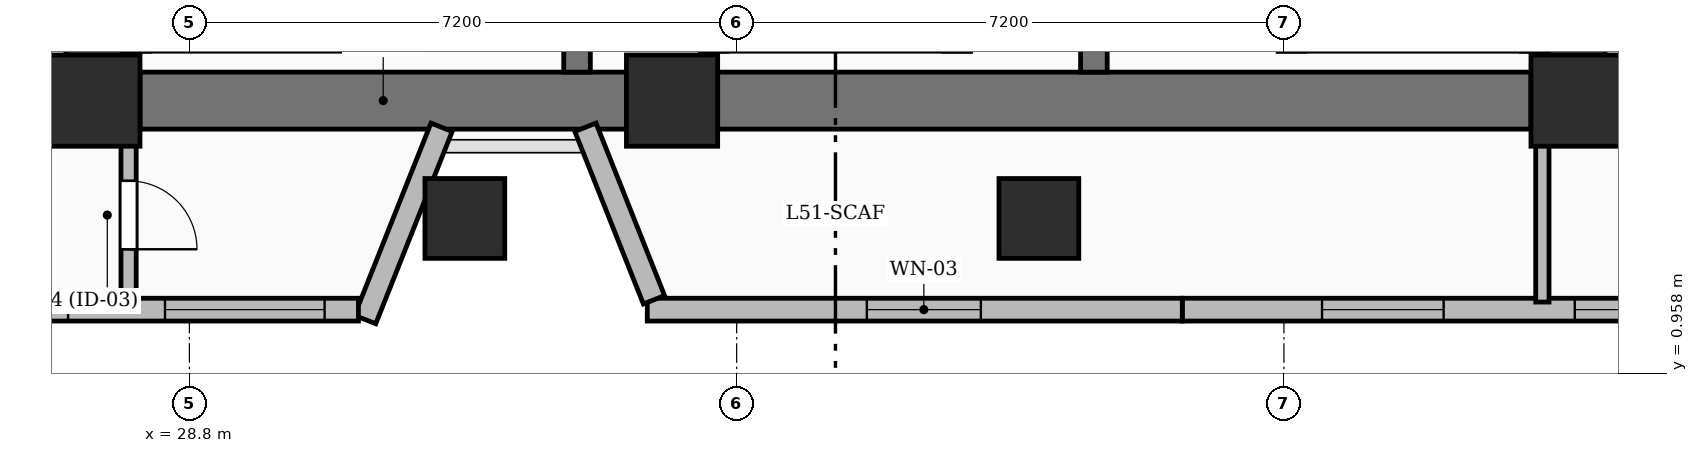
"""IFC4 building model, lengths in metres.
Left out: names, types, materials, properties, quantities, classifications, styles, units other than length and angle.
Written with IfcOpenShell. Run it as: python <this file> out.ifc"""

import sys

from ifc_helpers import new_model, si_unit, direction, frame, frame_2d, origin, origin_2d, place, context, subcontext, project, spatial, rectangle, extrude, element, fill, save


model = new_model("IFC4")
c1 = context("Model", 3, precision=1e-05, world=origin(), true_north=direction((0.0, 1.0)))
c2 = subcontext(c1, "Body", "Model", "MODEL_VIEW")
j1 = project(units=[si_unit("LENGTHUNIT", "METRE"), si_unit("PLANEANGLEUNIT", "RADIAN")], contexts=[c1])
p1 = place(None, origin())
s1 = spatial("IfcSite", under=j1, at=p1, CompositionType="ELEMENT")
p2 = place(p1, origin())
s2 = spatial("IfcBuilding", under=s1, at=p2, CompositionType="ELEMENT")
p3 = place(p2, frame((0.0, 0.0, 196.8)))
s3 = spatial("IfcBuildingStorey", under=s2, at=p3, CompositionType="ELEMENT", Elevation=196.8)
for number, where, z_axis, x_axis in (
    (1, (27.55, 4.55, 0.0), (0.0, 0.0, 1.0), (1.0, 0.0, 0.0)),
    (2, (35.15, 4.55, 0.0), (0.0, 0.0, 1.0), (1.0, 0.0, 0.0)),
    (3, (47.05, 4.55, 0.0), (0.0, 0.0, 1.0), (1.0, 0.0, 0.0)),
):
    element("IfcColumn", number, at=place(p3, frame(where, z_axis=z_axis, x_axis=x_axis)), inside=s3, PredefinedType="COLUMN", context=c2, shape_type="SweptSolid", body=[
        extrude(rectangle(XDim=1.2, YDim=1.2, at=origin_2d()), origin(), (0.0, 0.0, 1.0), 4.8),
    ])
p4 = place(p3, frame((28.15, 4.55, 0.0), z_axis=(0.0, 0.0, 1.0), x_axis=(1.0, 0.0, 0.0)))
e4 = element("IfcWall", 4, at=p4, inside=s3, PredefinedType="SHEAR", context=c2, shape_type="SweptSolid", body=[
    extrude(rectangle(XDim=6.4, YDim=0.75, at=frame_2d((3.2, 0.0))), origin(), (0.0, 0.0, 1.0), 4.8),
])
p5 = place(p3, frame((35.75, 4.55, 0.0), z_axis=(0.0, 0.0, 1.0), x_axis=(1.0, 0.0, 0.0)))
e5 = element("IfcWall", 5, at=p5, inside=s3, PredefinedType="SHEAR", context=c2, shape_type="SweptSolid", body=[
    extrude(rectangle(XDim=10.7, YDim=0.75, at=frame_2d((5.35, 0.0))), origin(), (0.0, 0.0, 1.0), 4.8),
])
for number, where, z_axis, x_axis in (
    (6, (27.55, 5.15, 0.0), (0.0, 0.0, 1.0), (0.0, 1.0, 0.0)),
    (7, (47.05, 5.15, 0.0), (0.0, 0.0, 1.0), (0.0, 1.0, 0.0)),
):
    element("IfcWall", number, at=place(p3, frame(where, z_axis=z_axis, x_axis=x_axis)), inside=s3, PredefinedType="SHEAR", context=c2, shape_type="SweptSolid", body=[
        extrude(rectangle(XDim=9.0, YDim=0.75, at=frame_2d((4.5, 0.0))), origin(), (0.0, 0.0, 1.0), 4.8),
    ])
for number, where, z_axis, x_axis in (
    (8, (33.9, 4.925, 0.0), (0.0, 0.0, 1.0), (0.0, 1.0, 0.0)),
    (9, (40.7, 4.925, 0.0), (0.0, 0.0, 1.0), (0.0, 1.0, 0.0)),
):
    element("IfcWall", number, at=place(p3, frame(where, z_axis=z_axis, x_axis=x_axis)), inside=s3, PredefinedType="SOLIDWALL", context=c2, shape_type="SweptSolid", body=[
        extrude(rectangle(XDim=3.0, YDim=0.35, at=frame_2d((1.5, 0.0))), origin(), (0.0, 0.0, 1.0), 4.8),
    ])
for number, where, z_axis, x_axis in (
    (10, (32.424, 3.0, 0.0), (0.0, 0.0, 1.0), (1.0, 0.0, 0.0)),
    (11, (39.976, 3.0, 0.0), (0.0, 0.0, 1.0), (1.0, 0.0, 0.0)),
):
    element("IfcColumn", number, at=place(p3, frame(where, z_axis=z_axis, x_axis=x_axis)), inside=s3, PredefinedType="COLUMN", context=c2, shape_type="SweptSolid", body=[
        extrude(rectangle(XDim=1.05, YDim=1.05, at=origin_2d()), origin(), (0.0, 0.0, 1.0), 4.8),
    ])
p6 = place(p3, frame((48.901, 1.8, 0.0), z_axis=(0.0, 0.0, 1.0), x_axis=(-1.0, 0.0, 0.0)))
e12 = element("IfcWall", 12, at=p6, inside=s3, PredefinedType="SOLIDWALL", context=c2, shape_type="SweptSolid", body=[
    extrude(rectangle(XDim=7.039, YDim=0.3, at=frame_2d((3.519, 0.0))), origin(), (0.0, 0.0, 1.0), 4.5),
])
p7 = place(p6, frame((3.6, 0.0, 0.55)))
e13 = element("IfcOpeningElement", 13, at=p7, cuts=e12, PredefinedType="OPENING", context=c2, shape_type="SweptSolid", body=[
    extrude(rectangle(XDim=1.6, YDim=2.2, at=frame_2d((0.8, 1.1))), frame((0.0, 0.16, 0.0), z_axis=(0.0, -1.0, 0.0), x_axis=(1.0, 0.0, 0.0)), (0.0, 0.0, 1.0), 0.32),
])
p8 = place(p6, frame((0.675, 0.0, 0.8)))
e14 = element("IfcOpeningElement", 14, at=p8, cuts=e12, PredefinedType="OPENING", context=c2, shape_type="SweptSolid", body=[
    extrude(rectangle(XDim=1.2, YDim=1.8, at=frame_2d((0.6, 0.9))), frame((0.0, 0.16, 0.0), z_axis=(0.0, -1.0, 0.0), x_axis=(1.0, 0.0, 0.0)), (0.0, 0.0, 1.0), 0.32),
])
p9 = place(p3, frame((41.863, 1.8, 0.0), z_axis=(0.0, 0.0, 1.0), x_axis=(-1.0, 0.0, 0.0)))
e15 = element("IfcWall", 15, at=p9, inside=s3, PredefinedType="SOLIDWALL", context=c2, shape_type="SweptSolid", body=[
    extrude(rectangle(XDim=7.039, YDim=0.3, at=frame_2d((3.52, 0.0))), origin(), (0.0, 0.0, 1.0), 4.5),
])
p10 = place(p9, frame((2.65, 0.0, 0.6)))
e16 = element("IfcOpeningElement", 16, at=p10, cuts=e15, PredefinedType="OPENING", context=c2, shape_type="SweptSolid", body=[
    extrude(rectangle(XDim=1.5, YDim=2.1, at=frame_2d((0.75, 1.05))), frame((0.0, 0.16, 0.0), z_axis=(0.0, -1.0, 0.0), x_axis=(1.0, 0.0, 0.0)), (0.0, 0.0, 1.0), 0.32),
])
p11 = place(p3, frame((34.912, 1.93, 0.0), z_axis=(0.0, 0.0, 1.0), x_axis=(-0.369476217581, 0.929240186734, 0.0)))
e17 = element("IfcWall", 17, at=p11, inside=s3, PredefinedType="SOLIDWALL", context=c2, shape_type="SweptSolid", body=[
    extrude(rectangle(XDim=2.442, YDim=0.3, at=frame_2d((1.221, 0.0))), origin(), (0.0, 0.0, 1.0), 2.3),
])
p12 = place(p3, frame((32.118, 4.199, 0.0), z_axis=(0.0, 0.0, 1.0), x_axis=(-0.369487569888, -0.929235672851, 0.0)))
e18 = element("IfcWall", 18, at=p12, inside=s3, PredefinedType="SOLIDWALL", context=c2, shape_type="SweptSolid", body=[
    extrude(rectangle(XDim=2.722, YDim=0.3, at=frame_2d((1.361, 0.0))), origin(), (0.0, 0.0, 1.0), 2.3),
])
p13 = place(p3, frame((31.024, 1.8, 0.0), z_axis=(0.0, 0.0, 1.0), x_axis=(-1.0, 0.0, 0.0)))
e19 = element("IfcWall", 19, at=p13, inside=s3, PredefinedType="SOLIDWALL", context=c2, shape_type="SweptSolid", body=[
    extrude(rectangle(XDim=7.142, YDim=0.3, at=frame_2d((3.571, 0.0))), origin(), (0.0, 0.0, 1.0), 4.5),
])
p14 = place(p13, frame((0.445, 0.0, 0.55)))
e20 = element("IfcOpeningElement", 20, at=p14, cuts=e19, PredefinedType="OPENING", context=c2, shape_type="SweptSolid", body=[
    extrude(rectangle(XDim=2.1, YDim=2.4, at=frame_2d((1.05, 1.2))), frame((0.0, 0.16, 0.0), z_axis=(0.0, -1.0, 0.0), x_axis=(1.0, 0.0, 0.0)), (0.0, 0.0, 1.0), 0.32),
])
p15 = place(p13, frame((3.82, 0.0, 0.55)))
e21 = element("IfcOpeningElement", 21, at=p15, cuts=e19, PredefinedType="OPENING", context=c2, shape_type="SweptSolid", body=[
    extrude(rectangle(XDim=2.1, YDim=2.4, at=frame_2d((1.05, 1.2))), frame((0.0, 0.16, 0.0), z_axis=(0.0, -1.0, 0.0), x_axis=(1.0, 0.0, 0.0)), (0.0, 0.0, 1.0), 0.32),
])
p16 = place(p3, frame((46.6, 1.9, 0.0), z_axis=(0.0, 0.0, 1.0), x_axis=(0.0, 1.0, 0.0)))
e22 = element("IfcWall", 22, at=p16, inside=s3, PredefinedType="PARTITIONING", context=c2, shape_type="SweptSolid", body=[
    extrude(rectangle(XDim=2.28, YDim=0.175, at=frame_2d((1.14, 0.0))), origin(), (0.0, 0.0, 1.0), 2.27),
])
p17 = place(p3, frame((28.0, 4.18, 0.0), z_axis=(0.0, 0.0, 1.0), x_axis=(0.0, -1.0, 0.0)))
e23 = element("IfcWall", 23, at=p17, inside=s3, PredefinedType="PARTITIONING", context=c2, shape_type="SweptSolid", body=[
    extrude(rectangle(XDim=2.28, YDim=0.2, at=frame_2d((1.14, 0.0))), origin(), (0.0, 0.0, 1.0), 2.27),
])
p18 = place(p17, frame((0.686, 0.0, 0.0)))
e24 = element("IfcOpeningElement", 24, at=p18, cuts=e23, PredefinedType="OPENING", context=c2, shape_type="SweptSolid", body=[
    extrude(rectangle(XDim=0.9, YDim=2.1, at=frame_2d((0.45, 1.05))), frame((0.0, 0.11, 0.0), z_axis=(0.0, -1.0, 0.0), x_axis=(1.0, 0.0, 0.0)), (0.0, 0.0, 1.0), 0.22),
])
p19 = place(p7, origin())
e25 = element("IfcWindow", 25, at=p19, inside=s3, PartitioningType="SINGLE_PANEL", PredefinedType="WINDOW", context=c2, shape_type="SweptSolid", body=[
    extrude(rectangle(XDim=1.6, YDim=2.2, at=frame_2d((0.8, 1.1))), frame((0.0, 0.03, 0.0), z_axis=(0.0, -1.0, 0.0), x_axis=(1.0, 0.0, 0.0)), (0.0, 0.0, 1.0), 0.06),
])
fill(e13, e25)
p20 = place(p8, origin())
e26 = element("IfcWindow", 26, at=p20, inside=s3, PartitioningType="SINGLE_PANEL", PredefinedType="WINDOW", context=c2, shape_type="SweptSolid", body=[
    extrude(rectangle(XDim=1.2, YDim=1.8, at=frame_2d((0.6, 0.9))), frame((0.0, 0.03, 0.0), z_axis=(0.0, -1.0, 0.0), x_axis=(1.0, 0.0, 0.0)), (0.0, 0.0, 1.0), 0.06),
])
fill(e14, e26)
p21 = place(p10, origin())
e27 = element("IfcWindow", 27, at=p21, inside=s3, PartitioningType="SINGLE_PANEL", PredefinedType="WINDOW", context=c2, shape_type="SweptSolid", body=[
    extrude(rectangle(XDim=1.5, YDim=2.1, at=frame_2d((0.75, 1.05))), frame((0.0, 0.03, 0.0), z_axis=(0.0, -1.0, 0.0), x_axis=(1.0, 0.0, 0.0)), (0.0, 0.0, 1.0), 0.06),
])
fill(e16, e27)
p22 = place(p14, origin())
e28 = element("IfcWindow", 28, at=p22, inside=s3, PartitioningType="SINGLE_PANEL", PredefinedType="WINDOW", context=c2, shape_type="SweptSolid", body=[
    extrude(rectangle(XDim=2.1, YDim=2.4, at=frame_2d((1.05, 1.2))), frame((0.0, 0.03, 0.0), z_axis=(0.0, -1.0, 0.0), x_axis=(1.0, 0.0, 0.0)), (0.0, 0.0, 1.0), 0.06),
])
fill(e20, e28)
p23 = place(p15, origin())
e29 = element("IfcWindow", 29, at=p23, inside=s3, PartitioningType="SINGLE_PANEL", PredefinedType="WINDOW", context=c2, shape_type="SweptSolid", body=[
    extrude(rectangle(XDim=2.1, YDim=2.4, at=frame_2d((1.05, 1.2))), frame((0.0, 0.03, 0.0), z_axis=(0.0, -1.0, 0.0), x_axis=(1.0, 0.0, 0.0)), (0.0, 0.0, 1.0), 0.06),
])
fill(e21, e29)
p24 = place(p18, origin())
e30 = element("IfcDoor", 30, at=p24, inside=s3, OperationType="SINGLE_SWING_RIGHT", PredefinedType="DOOR", context=c2, shape_type="SweptSolid", body=[
    extrude(rectangle(XDim=0.9, YDim=2.1, at=frame_2d((0.45, 1.05))), frame((0.0, 0.025, 0.0), z_axis=(0.0, -1.0, 0.0), x_axis=(1.0, 0.0, 0.0)), (0.0, 0.0, 1.0), 0.05),
])
fill(e24, e30)
save(model, sys.argv[1])
